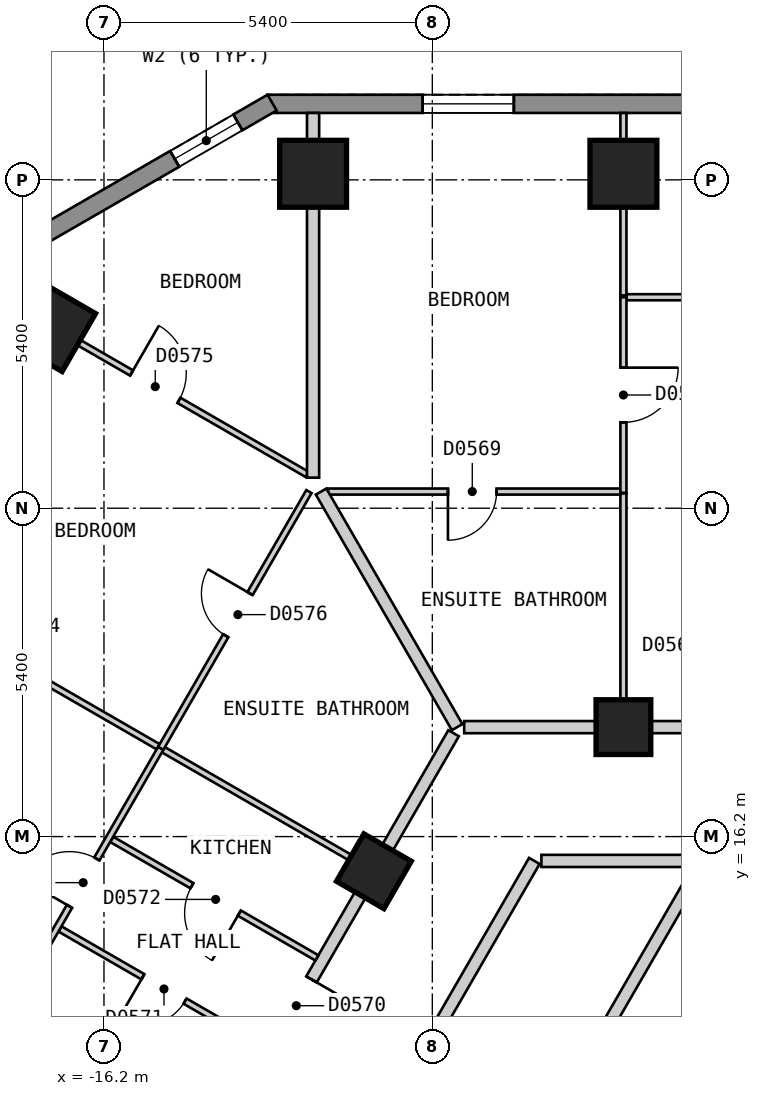
"""IFC4 building model, lengths in metres.
Left out: names, types, materials, properties, quantities, classifications, styles, units other than length and angle.
Written with IfcOpenShell. Run it as: python <this file> out.ifc"""

import sys

from ifc_helpers import new_model, si_unit, direction, frame, frame_2d, origin, origin_2d, place, context, subcontext, project, spatial, polyline, rectangle, outline, extrude, element, fill, save


model = new_model("IFC4")
c1 = context("Model", 3, precision=1e-05, world=origin(), true_north=direction((0.0, 1.0)))
c2 = subcontext(c1, "Body", "Model", "MODEL_VIEW")
j1 = project(units=[si_unit("LENGTHUNIT", "METRE"), si_unit("PLANEANGLEUNIT", "RADIAN")], contexts=[c1])
p1 = place(None, origin())
s1 = spatial("IfcSite", under=j1, at=p1, CompositionType="ELEMENT")
p2 = place(p1, origin())
s2 = spatial("IfcBuilding", under=s1, at=p2, CompositionType="ELEMENT")
p3 = place(p2, frame((0.0, 0.0, 56.4)))
s3 = spatial("IfcBuildingStorey", under=s2, at=p3, CompositionType="ELEMENT", Elevation=56.4)
for number, where, z_axis, x_axis in (
    (1, (-7.657, 27.1, 0.0), (0.0, 0.0, 1.0), (-1.0, 0.0, 0.0)),
    (2, (-12.761, 27.1, 0.0), (0.0, 0.0, 1.0), (-1.0, 0.0, 0.0)),
    (3, (-17.09, 24.6, 0.0), (0.0, 0.0, 1.0), (-0.5, -0.866, 0.0)),
):
    element("IfcColumn", number, at=place(p3, frame(where, z_axis=z_axis, x_axis=x_axis)), inside=s3, PredefinedType="COLUMN", context=c2, shape_type="SweptSolid", body=[
        extrude(rectangle(XDim=1.1, YDim=1.1, at=origin_2d()), origin(), (0.0, 0.0, 1.0), 3.0),
    ])
for number, where, z_axis, x_axis in (
    (4, (-7.657, 18.0, 0.0), (0.0, 0.0, 1.0), (-1.0, 0.0, 0.0)),
    (5, (-11.761, 15.63, 0.0), (0.0, 0.0, 1.0), (-0.5, -0.866, 0.0)),
):
    element("IfcColumn", number, at=place(p3, frame(where, z_axis=z_axis, x_axis=x_axis)), inside=s3, PredefinedType="COLUMN", context=c2, shape_type="SweptSolid", body=[
        extrude(rectangle(XDim=0.9, YDim=0.9, at=origin_2d()), origin(), (0.0, 0.0, 1.0), 3.0),
    ])
p4 = place(p3, frame((13.51, 28.25, 0.0), z_axis=(0.0, 0.0, 1.0), x_axis=(-1.0, 0.0, 0.0)))
e6 = element("IfcWall", 6, at=p4, inside=s3, PredefinedType="SOLIDWALL", context=c2, shape_type="SweptSolid", body=[
    extrude(outline(polyline([(0.0, -0.15), (27.02, -0.15), (26.94, 0.15), (0.08, 0.15), (0.0, -0.15)])), origin(), (0.0, 0.0, 1.0), 2.7),
])
p5 = place(p4, frame((2.553, 0.0, 0.15)))
e7 = element("IfcOpeningElement", 7, at=p5, cuts=e6, PredefinedType="OPENING", context=c2, shape_type="SweptSolid", body=[
    extrude(rectangle(XDim=1.5, YDim=2.1, at=frame_2d((0.75, 1.05))), frame((0.0, 0.16, 0.0), z_axis=(0.0, -1.0, 0.0), x_axis=(1.0, 0.0, 0.0)), (0.0, 0.0, 1.0), 0.32),
])
p6 = place(p4, frame((7.657, 0.0, 0.15)))
e8 = element("IfcOpeningElement", 8, at=p6, cuts=e6, PredefinedType="OPENING", context=c2, shape_type="SweptSolid", body=[
    extrude(rectangle(XDim=1.5, YDim=2.1, at=frame_2d((0.75, 1.05))), frame((0.0, 0.16, 0.0), z_axis=(0.0, -1.0, 0.0), x_axis=(1.0, 0.0, 0.0)), (0.0, 0.0, 1.0), 0.32),
])
p7 = place(p4, frame((12.761, 0.0, 0.15)))
e9 = element("IfcOpeningElement", 9, at=p7, cuts=e6, PredefinedType="OPENING", context=c2, shape_type="SweptSolid", body=[
    extrude(rectangle(XDim=1.5, YDim=2.1, at=frame_2d((0.75, 1.05))), frame((0.0, 0.16, 0.0), z_axis=(0.0, -1.0, 0.0), x_axis=(1.0, 0.0, 0.0)), (0.0, 0.0, 1.0), 0.32),
])
p8 = place(p4, frame((17.865, 0.0, 0.15)))
e10 = element("IfcOpeningElement", 10, at=p8, cuts=e6, PredefinedType="OPENING", context=c2, shape_type="SweptSolid", body=[
    extrude(rectangle(XDim=1.5, YDim=2.1, at=frame_2d((0.75, 1.05))), frame((0.0, 0.16, 0.0), z_axis=(0.0, -1.0, 0.0), x_axis=(1.0, 0.0, 0.0)), (0.0, 0.0, 1.0), 0.32),
])
p9 = place(p4, frame((22.969, 0.0, 0.15)))
e11 = element("IfcOpeningElement", 11, at=p9, cuts=e6, PredefinedType="OPENING", context=c2, shape_type="SweptSolid", body=[
    extrude(rectangle(XDim=1.5, YDim=2.1, at=frame_2d((0.75, 1.05))), frame((0.0, 0.16, 0.0), z_axis=(0.0, -1.0, 0.0), x_axis=(1.0, 0.0, 0.0)), (0.0, 0.0, 1.0), 0.32),
])
p10 = place(p3, frame((-13.435, 28.27, 0.0), z_axis=(0.0, 0.0, 1.0), x_axis=(-0.866010750942, -0.50002537861, 0.0)))
e12 = element("IfcWall", 12, at=p10, inside=s3, PredefinedType="SOLIDWALL", context=c2, shape_type="SweptSolid", body=[
    extrude(outline(polyline([(0.0, -0.15), (5.0, -0.15), (4.919, 0.15), (0.08, 0.15), (0.0, -0.15)])), origin(), (0.0, 0.0, 1.0), 2.7),
])
p11 = place(p10, frame((0.65, 0.0, 0.15)))
e13 = element("IfcOpeningElement", 13, at=p11, cuts=e12, PredefinedType="OPENING", context=c2, shape_type="SweptSolid", body=[
    extrude(rectangle(XDim=1.2, YDim=2.1, at=frame_2d((0.6, 1.05))), frame((0.0, 0.16, 0.0), z_axis=(0.0, -1.0, 0.0), x_axis=(1.0, 0.0, 0.0)), (0.0, 0.0, 1.0), 0.32),
])
p12 = place(p3, frame((-9.006, 15.8, 0.0), z_axis=(0.0, 0.0, 1.0), x_axis=(1.0, 0.0, 0.0)))
e14 = element("IfcWall", 14, at=p12, inside=s3, PredefinedType="PARTITIONING", context=c2, shape_type="SweptSolid", body=[
    extrude(rectangle(XDim=2.54, YDim=0.2, at=frame_2d((1.27, 0.0))), origin(), (0.0, 0.0, 1.0), 2.7),
])
p13 = place(p3, frame((-10.276, 18.0, 0.0), z_axis=(0.0, 0.0, 1.0), x_axis=(1.0, 0.0, 0.0)))
e15 = element("IfcWall", 15, at=p13, inside=s3, PredefinedType="PARTITIONING", context=c2, shape_type="SweptSolid", body=[
    extrude(rectangle(XDim=20.553, YDim=0.2, at=frame_2d((10.276, 0.0))), origin(), (0.0, 0.0, 1.0), 2.7),
])
p14 = place(p13, frame((14.879, 0.0, 0.0)))
e16 = element("IfcOpeningElement", 16, at=p14, cuts=e15, PredefinedType="OPENING", context=c2, shape_type="SweptSolid", body=[
    extrude(rectangle(XDim=1.0, YDim=2.1, at=frame_2d((0.5, 1.05))), frame((0.0, 0.11, 0.0), z_axis=(0.0, -1.0, 0.0), x_axis=(1.0, 0.0, 0.0)), (0.0, 0.0, 1.0), 0.22),
])
p15 = place(p13, frame((4.671, 0.0, 0.0)))
e17 = element("IfcOpeningElement", 17, at=p15, cuts=e15, PredefinedType="OPENING", context=c2, shape_type="SweptSolid", body=[
    extrude(rectangle(XDim=1.0, YDim=2.1, at=frame_2d((0.5, 1.05))), frame((0.0, 0.11, 0.0), z_axis=(0.0, -1.0, 0.0), x_axis=(1.0, 0.0, 0.0)), (0.0, 0.0, 1.0), 0.22),
])
p16 = place(p3, frame((-10.854, 8.0, 0.0), z_axis=(0.0, 0.0, 1.0), x_axis=(0.499964141897, 0.86604610548, 0.0)))
e18 = element("IfcWall", 18, at=p16, inside=s3, PredefinedType="PARTITIONING", context=c2, shape_type="SweptSolid", body=[
    extrude(rectangle(XDim=9.007, YDim=0.2, at=frame_2d((4.503, 0.0))), origin(), (0.0, 0.0, 1.0), 2.7),
])
p17 = place(p3, frame((-18.244, -0.001, 0.0), z_axis=(0.0, 0.0, 1.0), x_axis=(0.499962999376, 0.866046765051, 0.0)))
e19 = element("IfcWall", 19, at=p17, inside=s3, PredefinedType="PARTITIONING", context=c2, shape_type="SweptSolid", body=[
    extrude(rectangle(XDim=18.245, YDim=0.2, at=frame_2d((9.123, 0.0))), origin(), (0.0, 0.0, 1.0), 2.7),
])
p18 = place(p17, frame((8.672, 0.0, 0.0)))
e20 = element("IfcOpeningElement", 20, at=p18, cuts=e19, PredefinedType="OPENING", context=c2, shape_type="SweptSolid", body=[
    extrude(rectangle(XDim=0.9, YDim=2.1, at=frame_2d((0.45, 1.05))), frame((0.0, 0.11, 0.0), z_axis=(0.0, -1.0, 0.0), x_axis=(1.0, 0.0, 0.0)), (0.0, 0.0, 1.0), 0.22),
])
p19 = place(p3, frame((-20.727, 0.099, 0.0), z_axis=(0.0, 0.0, 1.0), x_axis=(0.499993204491, 0.866029327138, 0.0)))
e21 = element("IfcWall", 21, at=p19, inside=s3, PredefinedType="PARTITIONING", context=c2, shape_type="SweptSolid", body=[
    extrude(rectangle(XDim=20.554, YDim=0.2, at=frame_2d((10.277, 0.0))), origin(), (0.0, 0.0, 1.0), 2.7),
])
p20 = place(p19, frame((9.776, 0.0, 0.0)))
e22 = element("IfcOpeningElement", 22, at=p20, cuts=e21, PredefinedType="OPENING", context=c2, shape_type="SweptSolid", body=[
    extrude(rectangle(XDim=1.0, YDim=2.1, at=frame_2d((0.5, 1.05))), frame((0.0, 0.11, 0.0), z_axis=(0.0, -1.0, 0.0), x_axis=(1.0, 0.0, 0.0)), (0.0, 0.0, 1.0), 0.22),
])
p21 = place(p19, frame((4.673, 0.0, 0.0)))
e23 = element("IfcOpeningElement", 23, at=p21, cuts=e21, PredefinedType="OPENING", context=c2, shape_type="SweptSolid", body=[
    extrude(rectangle(XDim=1.0, YDim=2.1, at=frame_2d((0.5, 1.05))), frame((0.0, 0.11, 0.0), z_axis=(0.0, -1.0, 0.0), x_axis=(1.0, 0.0, 0.0)), (0.0, 0.0, 1.0), 0.22),
])
p22 = place(p19, frame((14.88, 0.0, 0.0)))
e24 = element("IfcOpeningElement", 24, at=p22, cuts=e21, PredefinedType="OPENING", context=c2, shape_type="SweptSolid", body=[
    extrude(rectangle(XDim=1.0, YDim=2.1, at=frame_2d((0.5, 1.05))), frame((0.0, 0.11, 0.0), z_axis=(0.0, -1.0, 0.0), x_axis=(1.0, 0.0, 0.0)), (0.0, 0.0, 1.0), 0.22),
])
p23 = place(p3, frame((-7.657, 28.1, 0.0), z_axis=(0.0, 0.0, 1.0), x_axis=(0.0, -1.0, 0.0)))
e25 = element("IfcWall", 25, at=p23, inside=s3, PredefinedType="PARTITIONING", context=c2, shape_type="SweptSolid", body=[
    extrude(rectangle(XDim=3.0, YDim=0.1, at=frame_2d((1.5, 0.0))), origin(), (0.0, 0.0, 1.0), 2.7),
])
p24 = place(p3, frame((-7.657, 21.844, 0.0), z_axis=(0.0, 0.0, 1.0), x_axis=(0.0, -1.0, 0.0)))
e26 = element("IfcWall", 26, at=p24, inside=s3, PredefinedType="PARTITIONING", context=c2, shape_type="SweptSolid", body=[
    extrude(rectangle(XDim=3.744, YDim=0.1, at=frame_2d((1.872, 0.0))), origin(), (0.0, 0.0, 1.0), 2.7),
])
p25 = place(p3, frame((-16.923, 14.681, 0.0), z_axis=(0.0, 0.0, 1.0), x_axis=(0.866087525071, -0.499892387336, 0.0)))
e27 = element("IfcWall", 27, at=p25, inside=s3, PredefinedType="PARTITIONING", context=c2, shape_type="SweptSolid", body=[
    extrude(rectangle(XDim=3.897, YDim=0.1, at=frame_2d((1.948, 0.0))), origin(), (0.0, 0.0, 1.0), 2.7),
])
p26 = place(p25, frame((1.574, 0.0, 0.0)))
e28 = element("IfcOpeningElement", 28, at=p26, cuts=e27, PredefinedType="OPENING", context=c2, shape_type="SweptSolid", body=[
    extrude(rectangle(XDim=0.8, YDim=2.1, at=frame_2d((0.4, 1.05))), frame((0.0, 0.06, 0.0), z_axis=(0.0, -1.0, 0.0), x_axis=(1.0, 0.0, 0.0)), (0.0, 0.0, 1.0), 0.12),
])
p27 = place(p3, frame((-16.073, 16.154, 0.0), z_axis=(0.0, 0.0, 1.0), x_axis=(0.865979019114, -0.500080332001, 0.0)))
e29 = element("IfcWall", 29, at=p27, inside=s3, PredefinedType="PARTITIONING", context=c2, shape_type="SweptSolid", body=[
    extrude(rectangle(XDim=3.897, YDim=0.1, at=frame_2d((1.949, 0.0))), origin(), (0.0, 0.0, 1.0), 2.7),
])
p28 = place(p27, frame((1.524, 0.0, 0.0)))
e30 = element("IfcOpeningElement", 30, at=p28, cuts=e29, PredefinedType="OPENING", context=c2, shape_type="SweptSolid", body=[
    extrude(rectangle(XDim=0.9, YDim=2.1, at=frame_2d((0.45, 1.05))), frame((0.0, 0.06, 0.0), z_axis=(0.0, -1.0, 0.0), x_axis=(1.0, 0.0, 0.0)), (0.0, 0.0, 1.0), 0.12),
])
p29 = place(p3, frame((-20.508, 20.679, 0.0), z_axis=(0.0, 0.0, 1.0), x_axis=(0.866047370643, -0.499961950354, 0.0)))
e31 = element("IfcWall", 31, at=p29, inside=s3, PredefinedType="PARTITIONING", context=c2, shape_type="SweptSolid", body=[
    extrude(rectangle(XDim=10.001, YDim=0.1, at=frame_2d((5.0, 0.0))), origin(), (0.0, 0.0, 1.0), 2.7),
])
p30 = place(p29, frame((2.576, 0.0, 0.0)))
e32 = element("IfcOpeningElement", 32, at=p30, cuts=e31, PredefinedType="OPENING", context=c2, shape_type="SweptSolid", body=[
    extrude(rectangle(XDim=0.9, YDim=2.1, at=frame_2d((0.45, 1.05))), frame((0.0, 0.06, 0.0), z_axis=(0.0, -1.0, 0.0), x_axis=(1.0, 0.0, 0.0)), (0.0, 0.0, 1.0), 0.12),
])
p31 = place(p3, frame((-17.955, 25.099, 0.0), z_axis=(0.0, 0.0, 1.0), x_axis=(0.866036353684, -0.499981033738, 0.0)))
e33 = element("IfcWall", 33, at=p31, inside=s3, PredefinedType="PARTITIONING", context=c2, shape_type="SweptSolid", body=[
    extrude(rectangle(XDim=5.885, YDim=0.1, at=frame_2d((2.942, 0.0))), origin(), (0.0, 0.0, 1.0), 2.7),
])
p32 = place(p31, frame((2.55, 0.0, 0.0)))
e34 = element("IfcOpeningElement", 34, at=p32, cuts=e33, PredefinedType="OPENING", context=c2, shape_type="SweptSolid", body=[
    extrude(rectangle(XDim=0.9, YDim=2.1, at=frame_2d((0.45, 1.05))), frame((0.0, 0.06, 0.0), z_axis=(0.0, -1.0, 0.0), x_axis=(1.0, 0.0, 0.0)), (0.0, 0.0, 1.0), 0.12),
])
p33 = place(p3, frame((-12.513, 21.874, 0.0), z_axis=(0.0, 0.0, 1.0), x_axis=(1.0, 0.0, 0.0)))
e35 = element("IfcWall", 35, at=p33, inside=s3, PredefinedType="PARTITIONING", context=c2, shape_type="SweptSolid", body=[
    extrude(rectangle(XDim=4.806, YDim=0.1, at=frame_2d((2.403, 0.0))), origin(), (0.0, 0.0, 1.0), 2.7),
])
p34 = place(p33, frame((1.97, 0.0, 0.0)))
e36 = element("IfcOpeningElement", 36, at=p34, cuts=e35, PredefinedType="OPENING", context=c2, shape_type="SweptSolid", body=[
    extrude(rectangle(XDim=0.8, YDim=2.1, at=frame_2d((0.4, 1.05))), frame((0.0, 0.06, 0.0), z_axis=(0.0, -1.0, 0.0), x_axis=(1.0, 0.0, 0.0)), (0.0, 0.0, 1.0), 0.12),
])
p35 = place(p3, frame((-7.607, 25.07, 0.0), z_axis=(0.0, 0.0, 1.0), x_axis=(1.0, 0.0, 0.0)))
e37 = element("IfcWall", 37, at=p35, inside=s3, PredefinedType="PARTITIONING", context=c2, shape_type="SweptSolid", body=[
    extrude(rectangle(XDim=4.954, YDim=0.1, at=frame_2d((2.477, 0.0))), origin(), (0.0, 0.0, 1.0), 2.7),
])
p36 = place(p35, frame((2.052, 0.0, 0.0)))
e38 = element("IfcOpeningElement", 38, at=p36, cuts=e37, PredefinedType="OPENING", context=c2, shape_type="SweptSolid", body=[
    extrude(rectangle(XDim=0.9, YDim=2.1, at=frame_2d((0.45, 1.05))), frame((0.0, 0.06, 0.0), z_axis=(0.0, -1.0, 0.0), x_axis=(1.0, 0.0, 0.0)), (0.0, 0.0, 1.0), 0.12),
])
p37 = place(p3, frame((-17.768, 13.319, 0.0), z_axis=(0.0, 0.0, 1.0), x_axis=(0.499958946799, 0.866049104564, 0.0)))
e39 = element("IfcWall", 39, at=p37, inside=s3, PredefinedType="PARTITIONING", context=c2, shape_type="SweptSolid", body=[
    extrude(rectangle(XDim=5.004, YDim=0.1, at=frame_2d((2.502, 0.0))), origin(), (0.0, 0.0, 1.0), 2.7),
])
p38 = place(p37, frame((2.002, 0.0, 0.0)))
e40 = element("IfcOpeningElement", 40, at=p38, cuts=e39, PredefinedType="OPENING", context=c2, shape_type="SweptSolid", body=[
    extrude(rectangle(XDim=0.9, YDim=2.1, at=frame_2d((0.45, 1.05))), frame((0.0, 0.06, 0.0), z_axis=(0.0, -1.0, 0.0), x_axis=(1.0, 0.0, 0.0)), (0.0, 0.0, 1.0), 0.12),
])
p39 = place(p3, frame((-7.657, 21.854, 0.0), z_axis=(0.0, 0.0, 1.0), x_axis=(0.0, 1.0, 0.0)))
e41 = element("IfcWall", 41, at=p39, inside=s3, PredefinedType="PARTITIONING", context=c2, shape_type="SweptSolid", body=[
    extrude(rectangle(XDim=3.216, YDim=0.1, at=frame_2d((1.608, 0.0))), origin(), (0.0, 0.0, 1.0), 2.7),
])
p40 = place(p39, frame((1.158, 0.0, 0.0)))
e42 = element("IfcOpeningElement", 42, at=p40, cuts=e41, PredefinedType="OPENING", context=c2, shape_type="SweptSolid", body=[
    extrude(rectangle(XDim=0.9, YDim=2.1, at=frame_2d((0.45, 1.05))), frame((0.0, 0.06, 0.0), z_axis=(0.0, -1.0, 0.0), x_axis=(1.0, 0.0, 0.0)), (0.0, 0.0, 1.0), 0.12),
])
p41 = place(p3, frame((-12.629, 21.874, 0.0), z_axis=(0.0, 0.0, 1.0), x_axis=(0.500024801635, -0.86601108408, 0.0)))
e43 = element("IfcWall", 43, at=p41, inside=s3, PredefinedType="PARTITIONING", context=c2, shape_type="SweptSolid", body=[
    extrude(rectangle(XDim=4.473, YDim=0.2, at=frame_2d((2.237, 0.0))), origin(), (0.0, 0.0, 1.0), 2.7),
])
p42 = place(p3, frame((-23.06, 16.259, 0.0), z_axis=(0.0, 0.0, 1.0), x_axis=(0.866047370643, -0.499961950354, 0.0)))
e44 = element("IfcWall", 44, at=p42, inside=s3, PredefinedType="PARTITIONING", context=c2, shape_type="SweptSolid", body=[
    extrude(rectangle(XDim=10.001, YDim=0.2, at=frame_2d((5.0, 0.0))), origin(), (0.0, 0.0, 1.0), 2.7),
])
p43 = place(p3, frame((-12.761, 22.103, 0.0), z_axis=(0.0, 0.0, 1.0), x_axis=(0.0, 1.0, 0.0)))
e45 = element("IfcWall", 45, at=p43, inside=s3, PredefinedType="PARTITIONING", context=c2, shape_type="SweptSolid", body=[
    extrude(rectangle(XDim=5.997, YDim=0.2, at=frame_2d((2.999, 0.0))), origin(), (0.0, 0.0, 1.0), 2.7),
])
p44 = place(p3, frame((-15.266, 17.653, 0.0), z_axis=(0.0, 0.0, 1.0), x_axis=(0.500007182864, 0.866021256716, 0.0)))
e46 = element("IfcWall", 46, at=p44, inside=s3, PredefinedType="PARTITIONING", context=c2, shape_type="SweptSolid", body=[
    extrude(rectangle(XDim=4.874, YDim=0.1, at=frame_2d((2.437, 0.0))), origin(), (0.0, 0.0, 1.0), 2.7),
])
p45 = place(p44, frame((2.137, 0.0, 0.0)))
e47 = element("IfcOpeningElement", 47, at=p45, cuts=e46, PredefinedType="OPENING", context=c2, shape_type="SweptSolid", body=[
    extrude(rectangle(XDim=0.8, YDim=2.1, at=frame_2d((0.4, 1.05))), frame((0.0, 0.06, 0.0), z_axis=(0.0, -1.0, 0.0), x_axis=(1.0, 0.0, 0.0)), (0.0, 0.0, 1.0), 0.12),
])
p46 = place(p9, origin())
e48 = element("IfcWindow", 48, at=p46, inside=s3, PartitioningType="SINGLE_PANEL", PredefinedType="WINDOW", context=c2, shape_type="SweptSolid", body=[
    extrude(rectangle(XDim=1.5, YDim=2.1, at=frame_2d((0.75, 1.05))), frame((0.0, 0.03, 0.0), z_axis=(0.0, -1.0, 0.0), x_axis=(1.0, 0.0, 0.0)), (0.0, 0.0, 1.0), 0.06),
])
fill(e11, e48)
p47 = place(p11, origin())
e49 = element("IfcWindow", 49, at=p47, inside=s3, PartitioningType="SINGLE_PANEL", PredefinedType="WINDOW", context=c2, shape_type="SweptSolid", body=[
    extrude(rectangle(XDim=1.2, YDim=2.1, at=frame_2d((0.6, 1.05))), frame((0.0, 0.03, 0.0), z_axis=(0.0, -1.0, 0.0), x_axis=(1.0, 0.0, 0.0)), (0.0, 0.0, 1.0), 0.06),
])
fill(e13, e49)
p48 = place(p40, origin())
e50 = element("IfcDoor", 50, at=p48, inside=s3, OperationType="SINGLE_SWING_RIGHT", PredefinedType="DOOR", context=c2, shape_type="SweptSolid", body=[
    extrude(rectangle(XDim=0.9, YDim=2.1, at=frame_2d((0.45, 1.05))), frame((0.0, 0.025, 0.0), z_axis=(0.0, -1.0, 0.0), x_axis=(1.0, 0.0, 0.0)), (0.0, 0.0, 1.0), 0.05),
])
fill(e42, e50)
p49 = place(p34, origin())
e51 = element("IfcDoor", 51, at=p49, inside=s3, OperationType="SINGLE_SWING_LEFT", PredefinedType="DOOR", context=c2, shape_type="SweptSolid", body=[
    extrude(rectangle(XDim=0.8, YDim=2.1, at=frame_2d((0.4, 1.05))), frame((0.0, 0.025, 0.0), z_axis=(0.0, -1.0, 0.0), x_axis=(1.0, 0.0, 0.0)), (0.0, 0.0, 1.0), 0.05),
])
fill(e36, e51)
p50 = place(p22, origin())
e52 = element("IfcDoor", 52, at=p50, inside=s3, OperationType="SINGLE_SWING_RIGHT", PredefinedType="DOOR", context=c2, shape_type="SweptSolid", body=[
    extrude(rectangle(XDim=1.0, YDim=2.1, at=frame_2d((0.5, 1.05))), frame((0.0, 0.025, 0.0), z_axis=(0.0, -1.0, 0.0), x_axis=(1.0, 0.0, 0.0)), (0.0, 0.0, 1.0), 0.05),
])
fill(e24, e52)
p51 = place(p26, origin())
e53 = element("IfcDoor", 53, at=p51, inside=s3, OperationType="SINGLE_SWING_LEFT", PredefinedType="DOOR", context=c2, shape_type="SweptSolid", body=[
    extrude(rectangle(XDim=0.8, YDim=2.1, at=frame_2d((0.4, 1.05))), frame((0.0, 0.025, 0.0), z_axis=(0.0, -1.0, 0.0), x_axis=(1.0, 0.0, 0.0)), (0.0, 0.0, 1.0), 0.05),
])
fill(e28, e53)
p52 = place(p28, origin())
e54 = element("IfcDoor", 54, at=p52, inside=s3, OperationType="SINGLE_SWING_RIGHT", PredefinedType="DOOR", context=c2, shape_type="SweptSolid", body=[
    extrude(rectangle(XDim=0.9, YDim=2.1, at=frame_2d((0.45, 1.05))), frame((0.0, 0.025, 0.0), z_axis=(0.0, -1.0, 0.0), x_axis=(1.0, 0.0, 0.0)), (0.0, 0.0, 1.0), 0.05),
])
fill(e30, e54)
p53 = place(p38, origin())
e55 = element("IfcDoor", 55, at=p53, inside=s3, OperationType="SINGLE_SWING_LEFT", PredefinedType="DOOR", context=c2, shape_type="SweptSolid", body=[
    extrude(rectangle(XDim=0.9, YDim=2.1, at=frame_2d((0.45, 1.05))), frame((0.0, 0.025, 0.0), z_axis=(0.0, -1.0, 0.0), x_axis=(1.0, 0.0, 0.0)), (0.0, 0.0, 1.0), 0.05),
])
fill(e40, e55)
p54 = place(p32, origin())
e56 = element("IfcDoor", 56, at=p54, inside=s3, OperationType="SINGLE_SWING_LEFT", PredefinedType="DOOR", context=c2, shape_type="SweptSolid", body=[
    extrude(rectangle(XDim=0.9, YDim=2.1, at=frame_2d((0.45, 1.05))), frame((0.0, 0.025, 0.0), z_axis=(0.0, -1.0, 0.0), x_axis=(1.0, 0.0, 0.0)), (0.0, 0.0, 1.0), 0.05),
])
fill(e34, e56)
p55 = place(p45, origin())
e57 = element("IfcDoor", 57, at=p55, inside=s3, OperationType="SINGLE_SWING_RIGHT", PredefinedType="DOOR", context=c2, shape_type="SweptSolid", body=[
    extrude(rectangle(XDim=0.8, YDim=2.1, at=frame_2d((0.4, 1.05))), frame((0.0, 0.025, 0.0), z_axis=(0.0, -1.0, 0.0), x_axis=(1.0, 0.0, 0.0)), (0.0, 0.0, 1.0), 0.05),
])
fill(e47, e57)
save(model, sys.argv[1])
